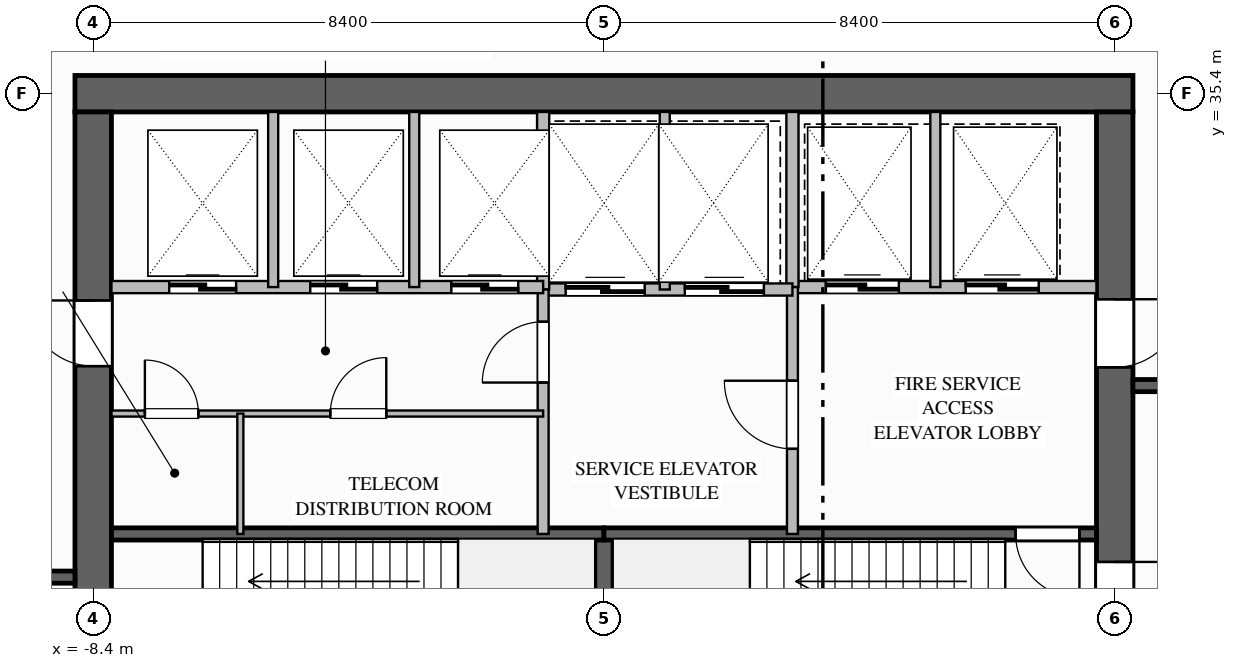
"""IFC4 building model, lengths in metres.
Left out: names, types, materials, properties, quantities, classifications, styles, units other than length and angle.
Written with IfcOpenShell. Run it as: python <this file> out.ifc"""

import sys

from ifc_helpers import new_model, si_unit, direction, frame, frame_2d, origin, place, context, subcontext, project, spatial, rectangle, extrude, element, fill, save


model = new_model("IFC4")
c1 = context("Model", 3, precision=1e-05, world=origin(), true_north=direction((0.0, 1.0)))
c2 = subcontext(c1, "Body", "Model", "MODEL_VIEW")
j1 = project(units=[si_unit("LENGTHUNIT", "METRE"), si_unit("PLANEANGLEUNIT", "RADIAN")], contexts=[c1])
p1 = place(None, origin())
s1 = spatial("IfcSite", under=j1, at=p1, CompositionType="ELEMENT")
p2 = place(p1, origin())
s2 = spatial("IfcBuilding", under=s1, at=p2, CompositionType="ELEMENT")
p3 = place(p2, origin())
s3 = spatial("IfcBuildingStorey", under=s2, at=p3, CompositionType="ELEMENT", Elevation=0.0)
p4 = place(p3, frame((-8.7, 35.4, 0.0), z_axis=(0.0, 0.0, 1.0), x_axis=(1.0, 0.0, 0.0)))
e1 = element("IfcWall", 1, at=p4, inside=s3, PredefinedType="SHEAR", context=c2, shape_type="SweptSolid", body=[
    extrude(rectangle(XDim=17.4, YDim=0.6, at=frame_2d((8.7, 0.0))), origin(), (0.0, 0.0, 1.0), 5.6),
])
p5 = place(p3, frame((8.4, 35.1, 0.0), z_axis=(0.0, 0.0, 1.0), x_axis=(0.0, -1.0, 0.0)))
e2 = element("IfcWall", 2, at=p5, inside=s3, PredefinedType="SHEAR", context=c2, shape_type="SweptSolid", body=[
    extrude(rectangle(XDim=16.2, YDim=0.6, at=frame_2d((8.1, 0.0))), origin(), (0.0, 0.0, 1.0), 5.6),
])
p6 = place(p5, frame((7.4, 0.0, 0.0)))
e3 = element("IfcOpeningElement", 3, at=p6, cuts=e2, PredefinedType="OPENING", context=c2, shape_type="SweptSolid", body=[
    extrude(rectangle(XDim=1.15, YDim=2.15, at=frame_2d((0.575, 1.075))), frame((0.0, 0.31, 0.0), z_axis=(0.0, -1.0, 0.0), x_axis=(1.0, 0.0, 0.0)), (0.0, 0.0, 1.0), 0.62),
])
p7 = place(p5, frame((3.08, 0.0, 0.0)))
e4 = element("IfcOpeningElement", 4, at=p7, cuts=e2, PredefinedType="OPENING", context=c2, shape_type="SweptSolid", body=[
    extrude(rectangle(XDim=1.12, YDim=2.1, at=frame_2d((0.56, 1.05))), frame((0.0, 0.31, 0.0), z_axis=(0.0, -1.0, 0.0), x_axis=(1.0, 0.0, 0.0)), (0.0, 0.0, 1.0), 0.62),
])
p8 = place(p5, frame((11.22, 0.0, 0.0)))
e5 = element("IfcOpeningElement", 5, at=p8, cuts=e2, PredefinedType="OPENING", context=c2, shape_type="SweptSolid", body=[
    extrude(rectangle(XDim=1.08, YDim=2.04, at=frame_2d((0.54, 1.02))), frame((0.0, 0.31, 0.0), z_axis=(0.0, -1.0, 0.0), x_axis=(1.0, 0.0, 0.0)), (0.0, 0.0, 1.0), 0.62),
])
p9 = place(p3, frame((-8.4, 18.9, 0.0), z_axis=(0.0, 0.0, 1.0), x_axis=(0.0, 1.0, 0.0)))
e6 = element("IfcWall", 6, at=p9, inside=s3, PredefinedType="SHEAR", context=c2, shape_type="SweptSolid", body=[
    extrude(rectangle(XDim=16.2, YDim=0.6, at=frame_2d((8.1, 0.0))), origin(), (0.0, 0.0, 1.0), 5.6),
])
p10 = place(p9, frame((7.12, 0.0, 0.0)))
e7 = element("IfcOpeningElement", 7, at=p10, cuts=e6, PredefinedType="OPENING", context=c2, shape_type="SweptSolid", body=[
    extrude(rectangle(XDim=1.15, YDim=2.15, at=frame_2d((0.575, 1.075))), frame((0.0, 0.31, 0.0), z_axis=(0.0, -1.0, 0.0), x_axis=(1.0, 0.0, 0.0)), (0.0, 0.0, 1.0), 0.62),
])
p11 = place(p9, frame((12.02, 0.0, 0.0)))
e8 = element("IfcOpeningElement", 8, at=p11, cuts=e6, PredefinedType="OPENING", context=c2, shape_type="SweptSolid", body=[
    extrude(rectangle(XDim=1.08, YDim=2.04, at=frame_2d((0.54, 1.02))), frame((0.0, 0.31, 0.0), z_axis=(0.0, -1.0, 0.0), x_axis=(1.0, 0.0, 0.0)), (0.0, 0.0, 1.0), 0.62),
])
p12 = place(p9, frame((3.9, 0.0, 0.0)))
e9 = element("IfcOpeningElement", 9, at=p12, cuts=e6, PredefinedType="OPENING", context=c2, shape_type="SweptSolid", body=[
    extrude(rectangle(XDim=1.08, YDim=2.04, at=frame_2d((0.54, 1.02))), frame((0.0, 0.31, 0.0), z_axis=(0.0, -1.0, 0.0), x_axis=(1.0, 0.0, 0.0)), (0.0, 0.0, 1.0), 0.62),
])
p13 = place(p3, frame((0.0, 25.04, 0.0), z_axis=(0.0, 0.0, 1.0), x_axis=(0.0, 1.0, 0.0)))
e10 = element("IfcWall", 10, at=p13, inside=s3, PredefinedType="SOLIDWALL", context=c2, shape_type="SweptSolid", body=[
    extrude(rectangle(XDim=3.12, YDim=0.3, at=frame_2d((1.56, 0.0))), origin(), (0.0, 0.0, 1.0), 5.3),
])
p14 = place(p3, frame((-8.1, 28.16, 0.0), z_axis=(0.0, 0.0, 1.0), x_axis=(1.0, 0.0, 0.0)))
e11 = element("IfcWall", 11, at=p14, inside=s3, PredefinedType="SOLIDWALL", context=c2, shape_type="SweptSolid", body=[
    extrude(rectangle(XDim=8.1, YDim=0.2, at=frame_2d((4.05, 0.0))), origin(), (0.0, 0.0, 1.0), 5.3),
])
p15 = place(p3, frame((8.1, 28.16, 0.0), z_axis=(0.0, 0.0, 1.0), x_axis=(-1.0, 0.0, 0.0)))
e12 = element("IfcWall", 12, at=p15, inside=s3, PredefinedType="SOLIDWALL", context=c2, shape_type="SweptSolid", body=[
    extrude(rectangle(XDim=8.1, YDim=0.2, at=frame_2d((4.05, 0.0))), origin(), (0.0, 0.0, 1.0), 5.3),
])
p16 = place(p15, frame((0.28, 0.0, 0.0)))
e13 = element("IfcOpeningElement", 13, at=p16, cuts=e12, PredefinedType="OPENING", context=c2, shape_type="SweptSolid", body=[
    extrude(rectangle(XDim=1.05, YDim=2.1, at=frame_2d((0.525, 1.05))), frame((0.0, 0.11, 0.0), z_axis=(0.0, -1.0, 0.0), x_axis=(1.0, 0.0, 0.0)), (0.0, 0.0, 1.0), 0.22),
])
p17 = place(p3, frame((3.1, 32.22, 0.0), z_axis=(0.0, 0.0, 1.0), x_axis=(1.0, 0.0, 0.0)))
e14 = element("IfcWall", 14, at=p17, inside=s3, PredefinedType="SOLIDWALL", context=c2, shape_type="SweptSolid", body=[
    extrude(rectangle(XDim=5.0, YDim=0.2, at=frame_2d((2.5, 0.0))), origin(), (0.0, 0.0, 1.0), 5.3),
])
p18 = place(p17, frame((0.55, 0.0, 0.0)))
e15 = element("IfcOpeningElement", 15, at=p18, cuts=e14, PredefinedType="OPENING", context=c2, shape_type="SweptSolid", body=[
    extrude(rectangle(XDim=1.2, YDim=2.2, at=frame_2d((0.6, 1.1))), frame((0.0, 0.11, 0.0), z_axis=(0.0, -1.0, 0.0), x_axis=(1.0, 0.0, 0.0)), (0.0, 0.0, 1.0), 0.22),
])
p19 = place(p17, frame((2.85, 0.0, 0.0)))
e16 = element("IfcOpeningElement", 16, at=p19, cuts=e14, PredefinedType="OPENING", context=c2, shape_type="SweptSolid", body=[
    extrude(rectangle(XDim=1.2, YDim=2.2, at=frame_2d((0.6, 1.1))), frame((0.0, 0.11, 0.0), z_axis=(0.0, -1.0, 0.0), x_axis=(1.0, 0.0, 0.0)), (0.0, 0.0, 1.0), 0.22),
])
p20 = place(p3, frame((3.1, 32.22, 0.0), z_axis=(0.0, 0.0, 1.0), x_axis=(0.0, 1.0, 0.0)))
e17 = element("IfcWall", 17, at=p20, inside=s3, PredefinedType="SOLIDWALL", context=c2, shape_type="SweptSolid", body=[
    extrude(rectangle(XDim=2.88, YDim=0.2, at=frame_2d((1.44, 0.0))), origin(), (0.0, 0.0, 1.0), 5.3),
])
p21 = place(p3, frame((5.45, 32.22, 0.0), z_axis=(0.0, 0.0, 1.0), x_axis=(0.0, 1.0, 0.0)))
e18 = element("IfcWall", 18, at=p21, inside=s3, PredefinedType="PARTITIONING", context=c2, shape_type="SweptSolid", body=[
    extrude(rectangle(XDim=2.88, YDim=0.165, at=frame_2d((1.44, 0.0))), origin(), (0.0, 0.0, 1.0), 5.3),
])
p22 = place(p3, frame((3.1, 28.16, 0.0), z_axis=(0.0, 0.0, 1.0), x_axis=(0.0, 1.0, 0.0)))
e19 = element("IfcWall", 19, at=p22, inside=s3, PredefinedType="SOLIDWALL", context=c2, shape_type="SweptSolid", body=[
    extrude(rectangle(XDim=4.06, YDim=0.18, at=frame_2d((2.03, 0.0))), origin(), (0.0, 0.0, 1.0), 5.3),
])
p23 = place(p22, frame((1.4, 0.0, 0.0)))
e20 = element("IfcOpeningElement", 20, at=p23, cuts=e19, PredefinedType="OPENING", context=c2, shape_type="SweptSolid", body=[
    extrude(rectangle(XDim=1.12, YDim=2.1, at=frame_2d((0.56, 1.05))), frame((0.0, 0.1, 0.0), z_axis=(0.0, -1.0, 0.0), x_axis=(1.0, 0.0, 0.0)), (0.0, 0.0, 1.0), 0.2),
])
p24 = place(p3, frame((-1.0, 32.18, 0.0), z_axis=(0.0, 0.0, 1.0), x_axis=(1.0, 0.0, 0.0)))
e21 = element("IfcWall", 21, at=p24, inside=s3, PredefinedType="SOLIDWALL", context=c2, shape_type="SweptSolid", body=[
    extrude(rectangle(XDim=4.1, YDim=0.2, at=frame_2d((2.05, 0.0))), origin(), (0.0, 0.0, 1.0), 5.3),
])
p25 = place(p24, frame((0.37, 0.0, 0.0)))
e22 = element("IfcOpeningElement", 22, at=p25, cuts=e21, PredefinedType="OPENING", context=c2, shape_type="SweptSolid", body=[
    extrude(rectangle(XDim=1.3, YDim=2.2, at=frame_2d((0.65, 1.1))), frame((0.0, 0.11, 0.0), z_axis=(0.0, -1.0, 0.0), x_axis=(1.0, 0.0, 0.0)), (0.0, 0.0, 1.0), 0.22),
])
p26 = place(p24, frame((2.33, 0.0, 0.0)))
e23 = element("IfcOpeningElement", 23, at=p26, cuts=e21, PredefinedType="OPENING", context=c2, shape_type="SweptSolid", body=[
    extrude(rectangle(XDim=1.3, YDim=2.2, at=frame_2d((0.65, 1.1))), frame((0.0, 0.11, 0.0), z_axis=(0.0, -1.0, 0.0), x_axis=(1.0, 0.0, 0.0)), (0.0, 0.0, 1.0), 0.22),
])
p27 = place(p3, frame((-1.0, 32.18, 0.0), z_axis=(0.0, 0.0, 1.0), x_axis=(0.0, 1.0, 0.0)))
e24 = element("IfcWall", 24, at=p27, inside=s3, PredefinedType="SOLIDWALL", context=c2, shape_type="SweptSolid", body=[
    extrude(rectangle(XDim=2.92, YDim=0.2, at=frame_2d((1.46, 0.0))), origin(), (0.0, 0.0, 1.0), 5.3),
])
p28 = place(p3, frame((1.0, 32.18, 0.0), z_axis=(0.0, 0.0, 1.0), x_axis=(0.0, 1.0, 0.0)))
e25 = element("IfcWall", 25, at=p28, inside=s3, PredefinedType="PARTITIONING", context=c2, shape_type="SweptSolid", body=[
    extrude(rectangle(XDim=2.92, YDim=0.165, at=frame_2d((1.46, 0.0))), origin(), (0.0, 0.0, 1.0), 5.3),
])
p29 = place(p3, frame((-1.0, 28.16, 0.0), z_axis=(0.0, 0.0, 1.0), x_axis=(0.0, 1.0, 0.0)))
e26 = element("IfcWall", 26, at=p29, inside=s3, PredefinedType="SOLIDWALL", context=c2, shape_type="SweptSolid", body=[
    extrude(rectangle(XDim=4.02, YDim=0.18, at=frame_2d((2.01, 0.0))), origin(), (0.0, 0.0, 1.0), 5.3),
])
p30 = place(p29, frame((2.49, 0.0, 0.0)))
e27 = element("IfcOpeningElement", 27, at=p30, cuts=e26, PredefinedType="OPENING", context=c2, shape_type="SweptSolid", body=[
    extrude(rectangle(XDim=1.0, YDim=2.1, at=frame_2d((0.5, 1.05))), frame((0.0, 0.1, 0.0), z_axis=(0.0, -1.0, 0.0), x_axis=(1.0, 0.0, 0.0)), (0.0, 0.0, 1.0), 0.2),
])
p31 = place(p3, frame((-8.1, 32.22, 0.0), z_axis=(0.0, 0.0, 1.0), x_axis=(1.0, 0.0, 0.0)))
e28 = element("IfcWall", 28, at=p31, inside=s3, PredefinedType="SOLIDWALL", context=c2, shape_type="SweptSolid", body=[
    extrude(rectangle(XDim=7.1, YDim=0.2, at=frame_2d((3.55, 0.0))), origin(), (0.0, 0.0, 1.0), 5.3),
])
p32 = place(p31, frame((0.95, 0.0, 0.0)))
e29 = element("IfcOpeningElement", 29, at=p32, cuts=e28, PredefinedType="OPENING", context=c2, shape_type="SweptSolid", body=[
    extrude(rectangle(XDim=1.1, YDim=2.2, at=frame_2d((0.55, 1.1))), frame((0.0, 0.11, 0.0), z_axis=(0.0, -1.0, 0.0), x_axis=(1.0, 0.0, 0.0)), (0.0, 0.0, 1.0), 0.22),
])
p33 = place(p31, frame((3.27, 0.0, 0.0)))
e30 = element("IfcOpeningElement", 30, at=p33, cuts=e28, PredefinedType="OPENING", context=c2, shape_type="SweptSolid", body=[
    extrude(rectangle(XDim=1.1, YDim=2.2, at=frame_2d((0.55, 1.1))), frame((0.0, 0.11, 0.0), z_axis=(0.0, -1.0, 0.0), x_axis=(1.0, 0.0, 0.0)), (0.0, 0.0, 1.0), 0.22),
])
p34 = place(p31, frame((5.59, 0.0, 0.0)))
e31 = element("IfcOpeningElement", 31, at=p34, cuts=e28, PredefinedType="OPENING", context=c2, shape_type="SweptSolid", body=[
    extrude(rectangle(XDim=1.1, YDim=2.2, at=frame_2d((0.55, 1.1))), frame((0.0, 0.11, 0.0), z_axis=(0.0, -1.0, 0.0), x_axis=(1.0, 0.0, 0.0)), (0.0, 0.0, 1.0), 0.22),
])
for number, where, z_axis, x_axis in (
    (32, (-5.44, 32.22, 0.0), (0.0, 0.0, 1.0), (0.0, 1.0, 0.0)),
    (33, (-3.12, 32.22, 0.0), (0.0, 0.0, 1.0), (0.0, 1.0, 0.0)),
):
    element("IfcWall", number, at=place(p3, frame(where, z_axis=z_axis, x_axis=x_axis)), inside=s3, PredefinedType="PARTITIONING", context=c2, shape_type="SweptSolid", body=[
        extrude(rectangle(XDim=2.88, YDim=0.165, at=frame_2d((1.44, 0.0))), origin(), (0.0, 0.0, 1.0), 5.3),
    ])
p35 = place(p3, frame((-8.1, 30.14, 0.0), z_axis=(0.0, 0.0, 1.0), x_axis=(1.0, 0.0, 0.0)))
e34 = element("IfcWall", 34, at=p35, inside=s3, PredefinedType="PARTITIONING", context=c2, shape_type="SweptSolid", body=[
    extrude(rectangle(XDim=7.1, YDim=0.1, at=frame_2d((3.55, 0.0))), origin(), (0.0, 0.0, 1.0), 5.3),
])
p36 = place(p35, frame((0.55, 0.0, 0.0)))
e35 = element("IfcOpeningElement", 35, at=p36, cuts=e34, PredefinedType="OPENING", context=c2, shape_type="SweptSolid", body=[
    extrude(rectangle(XDim=0.88, YDim=2.1, at=frame_2d((0.44, 1.05))), frame((0.0, 0.06, 0.0), z_axis=(0.0, -1.0, 0.0), x_axis=(1.0, 0.0, 0.0)), (0.0, 0.0, 1.0), 0.12),
])
p37 = place(p35, frame((3.6, 0.0, 0.0)))
e36 = element("IfcOpeningElement", 36, at=p37, cuts=e34, PredefinedType="OPENING", context=c2, shape_type="SweptSolid", body=[
    extrude(rectangle(XDim=0.92, YDim=2.1, at=frame_2d((0.46, 1.05))), frame((0.0, 0.06, 0.0), z_axis=(0.0, -1.0, 0.0), x_axis=(1.0, 0.0, 0.0)), (0.0, 0.0, 1.0), 0.12),
])
p38 = place(p3, frame((-5.98, 28.16, 0.0), z_axis=(0.0, 0.0, 1.0), x_axis=(0.0, 1.0, 0.0)))
e37 = element("IfcWall", 37, at=p38, inside=s3, PredefinedType="PARTITIONING", context=c2, shape_type="SweptSolid", body=[
    extrude(rectangle(XDim=1.98, YDim=0.1, at=frame_2d((0.99, 0.0))), origin(), (0.0, 0.0, 1.0), 5.3),
])
p39 = place(p3, frame((-26.76, 27.45, 0.0), z_axis=(0.0, 0.0, 1.0), x_axis=(1.0, 0.0, 0.0)))
e38 = element("IfcWall", 38, at=p39, inside=s3, PredefinedType="SOLIDWALL", context=c2, shape_type="SweptSolid", body=[
    extrude(rectangle(XDim=18.06, YDim=0.2, at=frame_2d((9.03, 0.0))), origin(), (0.0, 0.0, 1.0), 5.3),
])
p40 = place(p39, frame((14.5, 0.0, 0.0)))
e39 = element("IfcOpeningElement", 39, at=p40, cuts=e38, PredefinedType="OPENING", context=c2, shape_type="SweptSolid", body=[
    extrude(rectangle(XDim=1.15, YDim=2.15, at=frame_2d((0.575, 1.075))), frame((0.0, 0.11, 0.0), z_axis=(0.0, -1.0, 0.0), x_axis=(1.0, 0.0, 0.0)), (0.0, 0.0, 1.0), 0.22),
])
p41 = place(p3, frame((8.7, 30.6, 0.0), z_axis=(0.0, 0.0, 1.0), x_axis=(1.0, 0.0, 0.0)))
e40 = element("IfcWall", 40, at=p41, inside=s3, PredefinedType="SOLIDWALL", context=c2, shape_type="SweptSolid", body=[
    extrude(rectangle(XDim=30.06, YDim=0.2, at=frame_2d((15.03, 0.0))), origin(), (0.0, 0.0, 1.0), 5.3),
])
p42 = place(p41, frame((12.0, 0.0, 0.0)))
e41 = element("IfcOpeningElement", 41, at=p42, cuts=e40, PredefinedType="OPENING", context=c2, shape_type="SweptSolid", body=[
    extrude(rectangle(XDim=1.26, YDim=2.2, at=frame_2d((0.63, 1.1))), frame((0.0, 0.11, 0.0), z_axis=(0.0, -1.0, 0.0), x_axis=(1.0, 0.0, 0.0)), (0.0, 0.0, 1.0), 0.22),
])
p43 = place(p16, origin())
e42 = element("IfcDoor", 42, at=p43, inside=s3, OperationType="SINGLE_SWING_LEFT", PredefinedType="DOOR", context=c2, shape_type="SweptSolid", body=[
    extrude(rectangle(XDim=1.05, YDim=2.1, at=frame_2d((0.525, 1.05))), frame((0.0, 0.025, 0.0), z_axis=(0.0, -1.0, 0.0), x_axis=(1.0, 0.0, 0.0)), (0.0, 0.0, 1.0), 0.05),
])
fill(e13, e42)
p44 = place(p6, origin())
e43 = element("IfcDoor", 43, at=p44, inside=s3, OperationType="SINGLE_SWING_LEFT", PredefinedType="DOOR", context=c2, shape_type="SweptSolid", body=[
    extrude(rectangle(XDim=1.15, YDim=2.15, at=frame_2d((0.575, 1.075))), frame((0.0, 0.025, 0.0), z_axis=(0.0, -1.0, 0.0), x_axis=(1.0, 0.0, 0.0)), (0.0, 0.0, 1.0), 0.05),
])
fill(e3, e43)
p45 = place(p18, origin())
e44 = element("IfcDoor", 44, at=p45, inside=s3, OperationType="SLIDING_TO_LEFT", PredefinedType="DOOR", context=c2, shape_type="SweptSolid", body=[
    extrude(rectangle(XDim=1.2, YDim=2.2, at=frame_2d((0.6, 1.1))), frame((0.0, 0.025, 0.0), z_axis=(0.0, -1.0, 0.0), x_axis=(1.0, 0.0, 0.0)), (0.0, 0.0, 1.0), 0.05),
])
fill(e15, e44)
p46 = place(p19, origin())
e45 = element("IfcDoor", 45, at=p46, inside=s3, OperationType="SLIDING_TO_LEFT", PredefinedType="DOOR", context=c2, shape_type="SweptSolid", body=[
    extrude(rectangle(XDim=1.2, YDim=2.2, at=frame_2d((0.6, 1.1))), frame((0.0, 0.025, 0.0), z_axis=(0.0, -1.0, 0.0), x_axis=(1.0, 0.0, 0.0)), (0.0, 0.0, 1.0), 0.05),
])
fill(e16, e45)
p47 = place(p23, origin())
e46 = element("IfcDoor", 46, at=p47, inside=s3, OperationType="SINGLE_SWING_RIGHT", PredefinedType="DOOR", context=c2, shape_type="SweptSolid", body=[
    extrude(rectangle(XDim=1.12, YDim=2.1, at=frame_2d((0.56, 1.05))), frame((0.0, 0.025, 0.0), z_axis=(0.0, -1.0, 0.0), x_axis=(1.0, 0.0, 0.0)), (0.0, 0.0, 1.0), 0.05),
])
fill(e20, e46)
p48 = place(p7, origin())
e47 = element("IfcDoor", 47, at=p48, inside=s3, OperationType="SINGLE_SWING_LEFT", PredefinedType="DOOR", context=c2, shape_type="SweptSolid", body=[
    extrude(rectangle(XDim=1.12, YDim=2.1, at=frame_2d((0.56, 1.05))), frame((0.0, 0.025, 0.0), z_axis=(0.0, -1.0, 0.0), x_axis=(1.0, 0.0, 0.0)), (0.0, 0.0, 1.0), 0.05),
])
fill(e4, e47)
p49 = place(p25, origin())
e48 = element("IfcDoor", 48, at=p49, inside=s3, OperationType="SLIDING_TO_LEFT", PredefinedType="DOOR", context=c2, shape_type="SweptSolid", body=[
    extrude(rectangle(XDim=1.3, YDim=2.2, at=frame_2d((0.65, 1.1))), frame((0.0, 0.025, 0.0), z_axis=(0.0, -1.0, 0.0), x_axis=(1.0, 0.0, 0.0)), (0.0, 0.0, 1.0), 0.05),
])
fill(e22, e48)
p50 = place(p26, origin())
e49 = element("IfcDoor", 49, at=p50, inside=s3, OperationType="SLIDING_TO_LEFT", PredefinedType="DOOR", context=c2, shape_type="SweptSolid", body=[
    extrude(rectangle(XDim=1.3, YDim=2.2, at=frame_2d((0.65, 1.1))), frame((0.0, 0.025, 0.0), z_axis=(0.0, -1.0, 0.0), x_axis=(1.0, 0.0, 0.0)), (0.0, 0.0, 1.0), 0.05),
])
fill(e23, e49)
p51 = place(p30, origin())
e50 = element("IfcDoor", 50, at=p51, inside=s3, OperationType="SINGLE_SWING_LEFT", PredefinedType="DOOR", context=c2, shape_type="SweptSolid", body=[
    extrude(rectangle(XDim=1.0, YDim=2.1, at=frame_2d((0.5, 1.05))), frame((0.0, 0.025, 0.0), z_axis=(0.0, -1.0, 0.0), x_axis=(1.0, 0.0, 0.0)), (0.0, 0.0, 1.0), 0.05),
])
fill(e27, e50)
p52 = place(p32, origin())
e51 = element("IfcDoor", 51, at=p52, inside=s3, OperationType="SLIDING_TO_LEFT", PredefinedType="DOOR", context=c2, shape_type="SweptSolid", body=[
    extrude(rectangle(XDim=1.1, YDim=2.2, at=frame_2d((0.55, 1.1))), frame((0.0, 0.025, 0.0), z_axis=(0.0, -1.0, 0.0), x_axis=(1.0, 0.0, 0.0)), (0.0, 0.0, 1.0), 0.05),
])
fill(e29, e51)
p53 = place(p33, origin())
e52 = element("IfcDoor", 52, at=p53, inside=s3, OperationType="SLIDING_TO_LEFT", PredefinedType="DOOR", context=c2, shape_type="SweptSolid", body=[
    extrude(rectangle(XDim=1.1, YDim=2.2, at=frame_2d((0.55, 1.1))), frame((0.0, 0.025, 0.0), z_axis=(0.0, -1.0, 0.0), x_axis=(1.0, 0.0, 0.0)), (0.0, 0.0, 1.0), 0.05),
])
fill(e30, e52)
p54 = place(p34, origin())
e53 = element("IfcDoor", 53, at=p54, inside=s3, OperationType="SLIDING_TO_LEFT", PredefinedType="DOOR", context=c2, shape_type="SweptSolid", body=[
    extrude(rectangle(XDim=1.1, YDim=2.2, at=frame_2d((0.55, 1.1))), frame((0.0, 0.025, 0.0), z_axis=(0.0, -1.0, 0.0), x_axis=(1.0, 0.0, 0.0)), (0.0, 0.0, 1.0), 0.05),
])
fill(e31, e53)
p55 = place(p11, origin())
e54 = element("IfcDoor", 54, at=p55, inside=s3, OperationType="SINGLE_SWING_RIGHT", PredefinedType="DOOR", context=c2, shape_type="SweptSolid", body=[
    extrude(rectangle(XDim=1.08, YDim=2.04, at=frame_2d((0.54, 1.02))), frame((0.0, 0.025, 0.0), z_axis=(0.0, -1.0, 0.0), x_axis=(1.0, 0.0, 0.0)), (0.0, 0.0, 1.0), 0.05),
])
fill(e8, e54)
p56 = place(p36, origin())
e55 = element("IfcDoor", 55, at=p56, inside=s3, OperationType="SINGLE_SWING_LEFT", PredefinedType="DOOR", context=c2, shape_type="SweptSolid", body=[
    extrude(rectangle(XDim=0.88, YDim=2.1, at=frame_2d((0.44, 1.05))), frame((0.0, 0.025, 0.0), z_axis=(0.0, -1.0, 0.0), x_axis=(1.0, 0.0, 0.0)), (0.0, 0.0, 1.0), 0.05),
])
fill(e35, e55)
p57 = place(p37, origin())
e56 = element("IfcDoor", 56, at=p57, inside=s3, OperationType="SINGLE_SWING_RIGHT", PredefinedType="DOOR", context=c2, shape_type="SweptSolid", body=[
    extrude(rectangle(XDim=0.92, YDim=2.1, at=frame_2d((0.46, 1.05))), frame((0.0, 0.025, 0.0), z_axis=(0.0, -1.0, 0.0), x_axis=(1.0, 0.0, 0.0)), (0.0, 0.0, 1.0), 0.05),
])
fill(e36, e56)
save(model, sys.argv[1])
